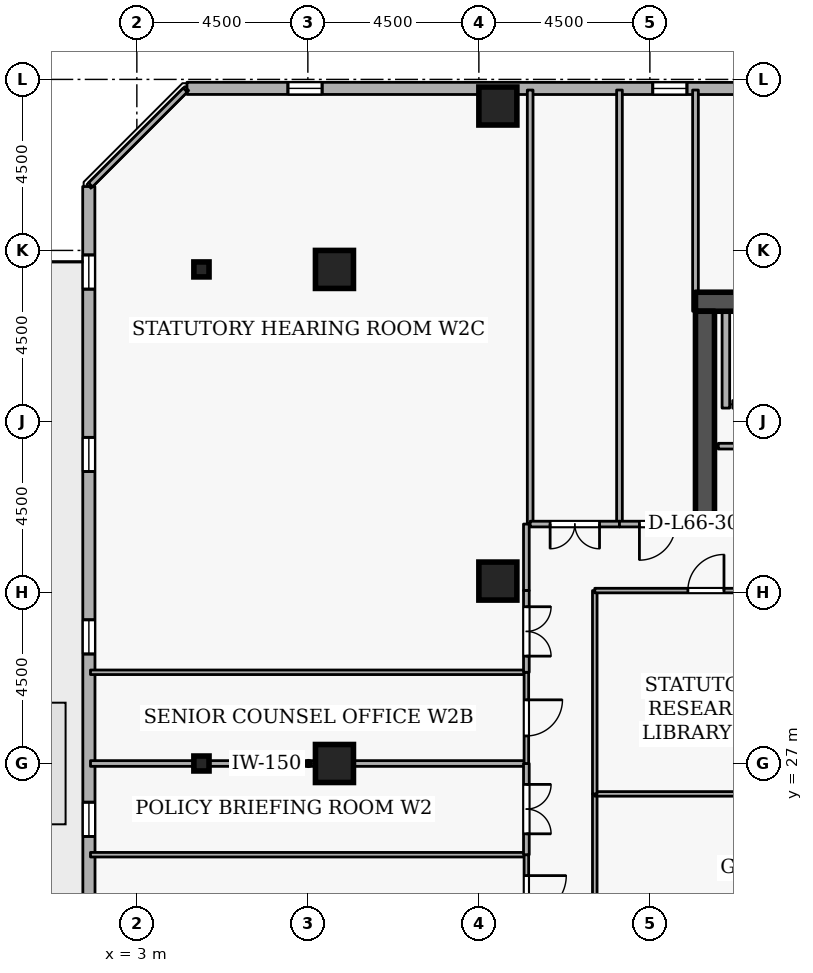
"""IFC4 building model, lengths in metres.
Left out: names, types, materials, properties, quantities, classifications, styles, units other than length and angle.
Written with IfcOpenShell. Run it as: python <this file> out.ifc"""

import sys

from ifc_helpers import new_model, si_unit, direction, frame, frame_2d, origin, origin_2d, place, context, subcontext, project, spatial, rectangle, i_section, extrude, element, fill, save


model = new_model("IFC4")
c1 = context("Model", 3, precision=1e-05, world=origin(), true_north=direction((0.0, 1.0)))
c2 = subcontext(c1, "Body", "Model", "MODEL_VIEW")
j1 = project(units=[si_unit("LENGTHUNIT", "METRE"), si_unit("PLANEANGLEUNIT", "RADIAN")], contexts=[c1])
p1 = place(None, origin())
s1 = spatial("IfcSite", under=j1, at=p1, CompositionType="ELEMENT")
p2 = place(p1, origin())
s2 = spatial("IfcBuilding", under=s1, at=p2, CompositionType="ELEMENT")
p3 = place(p2, frame((0.0, 0.0, 247.5)))
s3 = spatial("IfcBuildingStorey", under=s2, at=p3, CompositionType="ELEMENT", Elevation=247.5)
p4 = place(p3, frame((17.7, 39.15, 0.0), z_axis=(0.0, 0.0, 1.0), x_axis=(1.0, 0.0, 0.0)))
e1 = element("IfcWall", 1, at=p4, inside=s3, PredefinedType="SHEAR", context=c2, shape_type="SweptSolid", body=[
    extrude(rectangle(XDim=15.6, YDim=0.5, at=frame_2d((7.8, 0.0))), origin(), (0.0, 0.0, 1.0), 3.6),
])
p5 = place(p3, frame((17.95, 33.1, 0.0), z_axis=(0.0, 0.0, 1.0), x_axis=(0.0, 1.0, 0.0)))
e2 = element("IfcWall", 2, at=p5, inside=s3, PredefinedType="SHEAR", context=c2, shape_type="SweptSolid", body=[
    extrude(rectangle(XDim=5.8, YDim=0.5, at=frame_2d((2.9, 0.0))), origin(), (0.0, 0.0, 1.0), 3.6),
])
for number, where, z_axis, x_axis in (
    (3, (12.5, 44.3, 0.0), (0.0, 0.0, 1.0), (1.0, 0.0, 0.0)),
    (4, (8.2, 27.0, 0.0), (0.0, 0.0, 1.0), (1.0, 0.0, 0.0)),
    (5, (8.2, 40.0, 0.0), (0.0, 0.0, 1.0), (1.0, 0.0, 0.0)),
    (6, (12.5, 31.8, 0.0), (0.0, 0.0, 1.0), (1.0, 0.0, 0.0)),
):
    element("IfcColumn", number, at=place(p3, frame(where, z_axis=z_axis, x_axis=x_axis)), inside=s3, PredefinedType="COLUMN", context=c2, shape_type="SweptSolid", body=[
        extrude(rectangle(XDim=1.0, YDim=1.0, at=origin_2d()), origin(), (0.0, 0.0, 1.0), 3.6),
    ])
for number, where, z_axis, x_axis in (
    (7, (4.7, 27.0, 0.0), (0.0, 0.0, 1.0), (1.0, 0.0, 0.0)),
    (8, (4.7, 40.0, 0.0), (0.0, 0.0, 1.0), (1.0, 0.0, 0.0)),
):
    element("IfcColumn", number, at=place(p3, frame(where, z_axis=z_axis, x_axis=x_axis)), inside=s3, PredefinedType="COLUMN", context=c2, shape_type="SweptSolid", body=[
        extrude(i_section(OverallWidth=0.399, OverallDepth=0.394, WebThickness=0.023, FlangeThickness=0.037, FilletRadius=0.015, at=origin_2d()), origin(), (0.0, 0.0, 1.0), 3.6),
    ])
p6 = place(p3, frame((38.475, 44.757, 0.0), z_axis=(0.0, 0.0, 1.0), x_axis=(-0.99999997701, 0.000214431216, 0.0)))
e9 = element("IfcWall", 9, at=p6, inside=s3, PredefinedType="STANDARD", context=c2, shape_type="SweptSolid", body=[
    extrude(rectangle(XDim=34.156, YDim=0.32, at=frame_2d((17.078, 0.0))), origin(), (0.0, 0.0, 1.0), 2.7),
])
p7 = place(p6, frame((6.6, 0.0, 0.72)))
e10 = element("IfcOpeningElement", 10, at=p7, cuts=e9, PredefinedType="OPENING", context=c2, shape_type="SweptSolid", body=[
    extrude(rectangle(XDim=0.9, YDim=1.75, at=frame_2d((0.45, 0.875))), frame((0.0, 0.17, 0.0), z_axis=(0.0, -1.0, 0.0), x_axis=(1.0, 0.0, 0.0)), (0.0, 0.0, 1.0), 0.34),
])
p8 = place(p6, frame((16.2, 0.0, 0.72)))
e11 = element("IfcOpeningElement", 11, at=p8, cuts=e9, PredefinedType="OPENING", context=c2, shape_type="SweptSolid", body=[
    extrude(rectangle(XDim=0.9, YDim=1.75, at=frame_2d((0.45, 0.875))), frame((0.0, 0.17, 0.0), z_axis=(0.0, -1.0, 0.0), x_axis=(1.0, 0.0, 0.0)), (0.0, 0.0, 1.0), 0.34),
])
p9 = place(p6, frame((21.0, 0.0, 0.72)))
e12 = element("IfcOpeningElement", 12, at=p9, cuts=e9, PredefinedType="OPENING", context=c2, shape_type="SweptSolid", body=[
    extrude(rectangle(XDim=0.9, YDim=1.75, at=frame_2d((0.45, 0.875))), frame((0.0, 0.17, 0.0), z_axis=(0.0, -1.0, 0.0), x_axis=(1.0, 0.0, 0.0)), (0.0, 0.0, 1.0), 0.34),
])
p10 = place(p6, frame((30.6, 0.0, 0.72)))
e13 = element("IfcOpeningElement", 13, at=p10, cuts=e9, PredefinedType="OPENING", context=c2, shape_type="SweptSolid", body=[
    extrude(rectangle(XDim=0.9, YDim=1.75, at=frame_2d((0.45, 0.875))), frame((0.0, 0.17, 0.0), z_axis=(0.0, -1.0, 0.0), x_axis=(1.0, 0.0, 0.0)), (0.0, 0.0, 1.0), 0.34),
])
p11 = place(p3, frame((1.735, 42.181, 0.0), z_axis=(0.0, 0.0, 1.0), x_axis=(0.000214431216, -0.99999997701, 0.0)))
e14 = element("IfcWall", 14, at=p11, inside=s3, PredefinedType="STANDARD", context=c2, shape_type="SweptSolid", body=[
    extrude(rectangle(XDim=34.156, YDim=0.32, at=frame_2d((17.078, 0.0))), origin(), (0.0, 0.0, 1.0), 2.7),
])
p12 = place(p11, frame((18.878, 0.0, 0.0)))
e15 = element("IfcOpeningElement", 15, at=p12, cuts=e14, PredefinedType="OPENING", context=c2, shape_type="SweptSolid", body=[
    extrude(rectangle(XDim=1.0, YDim=2.08, at=frame_2d((0.5, 1.04))), frame((0.0, 0.17, 0.0), z_axis=(0.0, -1.0, 0.0), x_axis=(1.0, 0.0, 0.0)), (0.0, 0.0, 1.0), 0.34),
])
p13 = place(p11, frame((1.8, 0.0, 0.72)))
e16 = element("IfcOpeningElement", 16, at=p13, cuts=e14, PredefinedType="OPENING", context=c2, shape_type="SweptSolid", body=[
    extrude(rectangle(XDim=0.9, YDim=1.75, at=frame_2d((0.45, 0.875))), frame((0.0, 0.17, 0.0), z_axis=(0.0, -1.0, 0.0), x_axis=(1.0, 0.0, 0.0)), (0.0, 0.0, 1.0), 0.34),
])
p14 = place(p11, frame((6.6, 0.0, 0.72)))
e17 = element("IfcOpeningElement", 17, at=p14, cuts=e14, PredefinedType="OPENING", context=c2, shape_type="SweptSolid", body=[
    extrude(rectangle(XDim=0.9, YDim=1.75, at=frame_2d((0.45, 0.875))), frame((0.0, 0.17, 0.0), z_axis=(0.0, -1.0, 0.0), x_axis=(1.0, 0.0, 0.0)), (0.0, 0.0, 1.0), 0.34),
])
p15 = place(p11, frame((11.4, 0.0, 0.72)))
e18 = element("IfcOpeningElement", 18, at=p15, cuts=e14, PredefinedType="OPENING", context=c2, shape_type="SweptSolid", body=[
    extrude(rectangle(XDim=0.9, YDim=1.75, at=frame_2d((0.45, 0.875))), frame((0.0, 0.17, 0.0), z_axis=(0.0, -1.0, 0.0), x_axis=(1.0, 0.0, 0.0)), (0.0, 0.0, 1.0), 0.34),
])
p16 = place(p11, frame((16.2, 0.0, 0.72)))
e19 = element("IfcOpeningElement", 19, at=p16, cuts=e14, PredefinedType="OPENING", context=c2, shape_type="SweptSolid", body=[
    extrude(rectangle(XDim=0.9, YDim=1.75, at=frame_2d((0.45, 0.875))), frame((0.0, 0.17, 0.0), z_axis=(0.0, -1.0, 0.0), x_axis=(1.0, 0.0, 0.0)), (0.0, 0.0, 1.0), 0.34),
])
p17 = place(p11, frame((21.0, 0.0, 0.72)))
e20 = element("IfcOpeningElement", 20, at=p17, cuts=e14, PredefinedType="OPENING", context=c2, shape_type="SweptSolid", body=[
    extrude(rectangle(XDim=0.9, YDim=1.75, at=frame_2d((0.45, 0.875))), frame((0.0, 0.17, 0.0), z_axis=(0.0, -1.0, 0.0), x_axis=(1.0, 0.0, 0.0)), (0.0, 0.0, 1.0), 0.34),
])
p18 = place(p11, frame((25.8, 0.0, 0.72)))
e21 = element("IfcOpeningElement", 21, at=p18, cuts=e14, PredefinedType="OPENING", context=c2, shape_type="SweptSolid", body=[
    extrude(rectangle(XDim=0.9, YDim=1.75, at=frame_2d((0.45, 0.875))), frame((0.0, 0.17, 0.0), z_axis=(0.0, -1.0, 0.0), x_axis=(1.0, 0.0, 0.0)), (0.0, 0.0, 1.0), 0.34),
])
p19 = place(p11, frame((30.6, 0.0, 0.72)))
e22 = element("IfcOpeningElement", 22, at=p19, cuts=e14, PredefinedType="OPENING", context=c2, shape_type="SweptSolid", body=[
    extrude(rectangle(XDim=0.9, YDim=1.75, at=frame_2d((0.45, 0.875))), frame((0.0, 0.17, 0.0), z_axis=(0.0, -1.0, 0.0), x_axis=(1.0, 0.0, 0.0)), (0.0, 0.0, 1.0), 0.34),
])
p20 = place(p3, frame((20.62, 36.45, 0.0), z_axis=(0.0, 0.0, 1.0), x_axis=(-1.0, 0.0, 0.0)))
e23 = element("IfcWall", 23, at=p20, inside=s3, PredefinedType="STANDARD", context=c2, shape_type="SweptSolid", body=[
    extrude(rectangle(XDim=1.94, YDim=0.2, at=frame_2d((0.97, 0.0))), origin(), (0.0, 0.0, 1.0), 3.34),
])
p21 = place(p20, frame((0.46, 0.0, 0.0)))
e24 = element("IfcOpeningElement", 24, at=p21, cuts=e23, PredefinedType="OPENING", context=c2, shape_type="SweptSolid", body=[
    extrude(rectangle(XDim=1.02, YDim=2.06, at=frame_2d((0.51, 1.03))), frame((0.0, 0.11, 0.0), z_axis=(0.0, -1.0, 0.0), x_axis=(1.0, 0.0, 0.0)), (0.0, 0.0, 1.0), 0.22),
])
p22 = place(p3, frame((18.5, 36.352, 0.0), z_axis=(0.0, 0.0, 1.0), x_axis=(0.0, 1.0, 0.0)))
e25 = element("IfcWall", 25, at=p22, inside=s3, PredefinedType="STANDARD", context=c2, shape_type="SweptSolid", body=[
    extrude(rectangle(XDim=2.536, YDim=0.2, at=frame_2d((1.268, 0.0))), origin(), (0.0, 0.0, 1.0), 3.34),
])
p23 = place(p3, frame((18.3, 33.3, 0.0), z_axis=(0.0, 0.0, 1.0), x_axis=(1.0, 0.0, 0.0)))
e26 = element("IfcWall", 26, at=p23, inside=s3, PredefinedType="PARTITIONING", context=c2, shape_type="SweptSolid", body=[
    extrude(rectangle(XDim=3.3, YDim=0.15, at=frame_2d((1.65, 0.0))), origin(), (0.0, 0.0, 1.0), 3.34),
])
p24 = place(p23, frame((1.19, 0.0, 0.0)))
e27 = element("IfcOpeningElement", 27, at=p24, cuts=e26, PredefinedType="OPENING", context=c2, shape_type="SweptSolid", body=[
    extrude(rectangle(XDim=0.92, YDim=2.08, at=frame_2d((0.46, 1.04))), frame((0.0, 0.085, 0.0), z_axis=(0.0, -1.0, 0.0), x_axis=(1.0, 0.0, 0.0)), (0.0, 0.0, 1.0), 0.17),
])
p25 = place(p3, frame((21.6, 35.35, 0.0), z_axis=(0.0, 0.0, 1.0), x_axis=(-1.0, 0.0, 0.0)))
e28 = element("IfcWall", 28, at=p25, inside=s3, PredefinedType="PARTITIONING", context=c2, shape_type="SweptSolid", body=[
    extrude(rectangle(XDim=3.3, YDim=0.15, at=frame_2d((1.65, 0.0))), origin(), (0.0, 0.0, 1.0), 3.34),
])
for number, where, z_axis, x_axis in (
    (29, (13.35, 33.3, 0.0), (0.0, 0.0, 1.0), (0.0, 1.0, 0.0)),
    (30, (15.7, 44.72, 0.0), (0.0, 0.0, 1.0), (0.0, -1.0, 0.0)),
):
    element("IfcWall", number, at=place(p3, frame(where, z_axis=z_axis, x_axis=x_axis)), inside=s3, PredefinedType="PARTITIONING", context=c2, shape_type="SweptSolid", body=[
        extrude(rectangle(XDim=11.42, YDim=0.15, at=frame_2d((5.71, 0.0))), origin(), (0.0, 0.0, 1.0), 3.34),
    ])
p26 = place(p3, frame((15.7, 33.3, 0.0), z_axis=(0.0, 0.0, 1.0), x_axis=(-1.0, 0.0, 0.0)))
e31 = element("IfcWall", 31, at=p26, inside=s3, PredefinedType="PARTITIONING", context=c2, shape_type="SweptSolid", body=[
    extrude(rectangle(XDim=2.35, YDim=0.15, at=frame_2d((1.175, 0.0))), origin(), (0.0, 0.0, 1.0), 3.34),
])
p27 = place(p26, frame((0.525, 0.0, 0.0)))
e32 = element("IfcOpeningElement", 32, at=p27, cuts=e31, PredefinedType="OPENING", context=c2, shape_type="SweptSolid", body=[
    extrude(rectangle(XDim=1.3, YDim=2.12, at=frame_2d((0.65, 1.06))), frame((0.0, 0.085, 0.0), z_axis=(0.0, -1.0, 0.0), x_axis=(1.0, 0.0, 0.0)), (0.0, 0.0, 1.0), 0.17),
])
p28 = place(p3, frame((17.7, 44.72, 0.0), z_axis=(0.0, 0.0, 1.0), x_axis=(0.0, -1.0, 0.0)))
e33 = element("IfcWall", 33, at=p28, inside=s3, PredefinedType="PARTITIONING", context=c2, shape_type="SweptSolid", body=[
    extrude(rectangle(XDim=5.82, YDim=0.15, at=frame_2d((2.91, 0.0))), origin(), (0.0, 0.0, 1.0), 2.545),
])
p29 = place(p3, frame((17.7, 33.3, 0.0), z_axis=(0.0, 0.0, 1.0), x_axis=(-1.0, 0.0, 0.0)))
e34 = element("IfcWall", 34, at=p29, inside=s3, PredefinedType="PARTITIONING", context=c2, shape_type="SweptSolid", body=[
    extrude(rectangle(XDim=2.0, YDim=0.15, at=frame_2d((1.0, 0.0))), origin(), (0.0, 0.0, 1.0), 3.34),
])
p30 = place(p29, frame((0.525, 0.0, 0.0)))
e35 = element("IfcOpeningElement", 35, at=p30, cuts=e34, PredefinedType="OPENING", context=c2, shape_type="SweptSolid", body=[
    extrude(rectangle(XDim=0.95, YDim=2.1, at=frame_2d((0.475, 1.05))), frame((0.0, 0.085, 0.0), z_axis=(0.0, -1.0, 0.0), x_axis=(1.0, 0.0, 0.0)), (0.0, 0.0, 1.0), 0.17),
])
p31 = place(p3, frame((1.78, 24.6, 0.0), z_axis=(0.0, 0.0, 1.0), x_axis=(1.0, 0.0, 0.0)))
e36 = element("IfcWall", 36, at=p31, inside=s3, PredefinedType="PARTITIONING", context=c2, shape_type="SweptSolid", body=[
    extrude(rectangle(XDim=11.47, YDim=0.12, at=frame_2d((5.735, 0.0))), origin(), (0.0, 0.0, 1.0), 3.34),
])
p32 = place(p3, frame((13.25, 24.6, 0.0), z_axis=(0.0, 0.0, 1.0), x_axis=(0.0, -1.0, 0.0)))
e37 = element("IfcWall", 37, at=p32, inside=s3, PredefinedType="PARTITIONING", context=c2, shape_type="SweptSolid", body=[
    extrude(rectangle(XDim=2.15, YDim=0.12, at=frame_2d((1.075, 0.0))), origin(), (0.0, 0.0, 1.0), 3.34),
])
p33 = place(p32, frame((0.55, 0.0, 0.0)))
e38 = element("IfcOpeningElement", 38, at=p33, cuts=e37, PredefinedType="OPENING", context=c2, shape_type="SweptSolid", body=[
    extrude(rectangle(XDim=1.05, YDim=2.1, at=frame_2d((0.525, 1.05))), frame((0.0, 0.07, 0.0), z_axis=(0.0, -1.0, 0.0), x_axis=(1.0, 0.0, 0.0)), (0.0, 0.0, 1.0), 0.14),
])
p34 = place(p3, frame((1.78, 27.0, 0.0), z_axis=(0.0, 0.0, 1.0), x_axis=(1.0, 0.0, 0.0)))
e39 = element("IfcWall", 39, at=p34, inside=s3, PredefinedType="PARTITIONING", context=c2, shape_type="SweptSolid", body=[
    extrude(rectangle(XDim=11.47, YDim=0.15, at=frame_2d((5.735, 0.0))), origin(), (0.0, 0.0, 1.0), 2.882),
])
p35 = place(p3, frame((13.25, 27.0, 0.0), z_axis=(0.0, 0.0, 1.0), x_axis=(0.0, -1.0, 0.0)))
e40 = element("IfcWall", 40, at=p35, inside=s3, PredefinedType="PARTITIONING", context=c2, shape_type="SweptSolid", body=[
    extrude(rectangle(XDim=2.4, YDim=0.15, at=frame_2d((1.2, 0.0))), origin(), (0.0, 0.0, 1.0), 3.34),
])
p36 = place(p35, frame((0.55, 0.0, 0.0)))
e41 = element("IfcOpeningElement", 41, at=p36, cuts=e40, PredefinedType="OPENING", context=c2, shape_type="SweptSolid", body=[
    extrude(rectangle(XDim=1.3, YDim=2.12, at=frame_2d((0.65, 1.06))), frame((0.0, 0.085, 0.0), z_axis=(0.0, -1.0, 0.0), x_axis=(1.0, 0.0, 0.0)), (0.0, 0.0, 1.0), 0.17),
])
p37 = place(p3, frame((1.78, 29.4, 0.0), z_axis=(0.0, 0.0, 1.0), x_axis=(1.0, 0.0, 0.0)))
e42 = element("IfcWall", 42, at=p37, inside=s3, PredefinedType="PARTITIONING", context=c2, shape_type="SweptSolid", body=[
    extrude(rectangle(XDim=11.47, YDim=0.12, at=frame_2d((5.735, 0.0))), origin(), (0.0, 0.0, 1.0), 3.34),
])
p38 = place(p3, frame((13.25, 29.4, 0.0), z_axis=(0.0, 0.0, 1.0), x_axis=(0.0, -1.0, 0.0)))
e43 = element("IfcWall", 43, at=p38, inside=s3, PredefinedType="PARTITIONING", context=c2, shape_type="SweptSolid", body=[
    extrude(rectangle(XDim=2.4, YDim=0.12, at=frame_2d((1.2, 0.0))), origin(), (0.0, 0.0, 1.0), 3.34),
])
p39 = place(p38, frame((0.725, 0.0, 0.0)))
e44 = element("IfcOpeningElement", 44, at=p39, cuts=e43, PredefinedType="OPENING", context=c2, shape_type="SweptSolid", body=[
    extrude(rectangle(XDim=0.95, YDim=2.1, at=frame_2d((0.475, 1.05))), frame((0.0, 0.07, 0.0), z_axis=(0.0, -1.0, 0.0), x_axis=(1.0, 0.0, 0.0)), (0.0, 0.0, 1.0), 0.14),
])
p40 = place(p3, frame((1.78, 42.225, 0.0), z_axis=(0.0, 0.0, 1.0), x_axis=(0.707106781187, 0.707106781187, 0.0)))
e45 = element("IfcWall", 45, at=p40, inside=s3, PredefinedType="PARTITIONING", context=c2, shape_type="SweptSolid", body=[
    extrude(rectangle(XDim=3.528, YDim=0.15, at=frame_2d((1.764, 0.0))), origin(), (0.0, 0.0, 1.0), 3.34),
])
p41 = place(p3, frame((13.25, 33.3, 0.0), z_axis=(0.0, 0.0, 1.0), x_axis=(0.0, -1.0, 0.0)))
e46 = element("IfcWall", 46, at=p41, inside=s3, PredefinedType="PARTITIONING", context=c2, shape_type="SweptSolid", body=[
    extrude(rectangle(XDim=1.75, YDim=0.15, at=frame_2d((0.875, 0.0))), origin(), (0.0, 0.0, 1.0), 3.34),
])
p42 = place(p3, frame((13.25, 31.55, 0.0), z_axis=(0.0, 0.0, 1.0), x_axis=(0.0, -1.0, 0.0)))
e47 = element("IfcWall", 47, at=p42, inside=s3, PredefinedType="PARTITIONING", context=c2, shape_type="SweptSolid", body=[
    extrude(rectangle(XDim=2.15, YDim=0.15, at=frame_2d((1.075, 0.0))), origin(), (0.0, 0.0, 1.0), 3.34),
])
p43 = place(p42, frame((0.425, 0.0, 0.0)))
e48 = element("IfcOpeningElement", 48, at=p43, cuts=e47, PredefinedType="OPENING", context=c2, shape_type="SweptSolid", body=[
    extrude(rectangle(XDim=1.3, YDim=2.12, at=frame_2d((0.65, 1.06))), frame((0.0, 0.085, 0.0), z_axis=(0.0, -1.0, 0.0), x_axis=(1.0, 0.0, 0.0)), (0.0, 0.0, 1.0), 0.17),
])
p44 = place(p3, frame((15.05, 22.45, 0.0), z_axis=(0.0, 0.0, 1.0), x_axis=(0.0, 1.0, 0.0)))
e49 = element("IfcWall", 49, at=p44, inside=s3, PredefinedType="PARTITIONING", context=c2, shape_type="SweptSolid", body=[
    extrude(rectangle(XDim=3.75, YDim=0.12, at=frame_2d((1.875, 0.0))), origin(), (0.0, 0.0, 1.0), 3.34),
])
p45 = place(p3, frame((15.05, 26.2, 0.0), z_axis=(0.0, 0.0, 1.0), x_axis=(1.0, 0.0, 0.0)))
e50 = element("IfcWall", 50, at=p45, inside=s3, PredefinedType="PARTITIONING", context=c2, shape_type="SweptSolid", body=[
    extrude(rectangle(XDim=5.85, YDim=0.12, at=frame_2d((2.925, 0.0))), origin(), (0.0, 0.0, 1.0), 3.34),
])
p46 = place(p3, frame((15.05, 26.2, 0.0), z_axis=(0.0, 0.0, 1.0), x_axis=(0.0, 1.0, 0.0)))
e51 = element("IfcWall", 51, at=p46, inside=s3, PredefinedType="PARTITIONING", context=c2, shape_type="SweptSolid", body=[
    extrude(rectangle(XDim=5.35, YDim=0.12, at=frame_2d((2.675, 0.0))), origin(), (0.0, 0.0, 1.0), 3.34),
])
p47 = place(p3, frame((15.05, 31.55, 0.0), z_axis=(0.0, 0.0, 1.0), x_axis=(1.0, 0.0, 0.0)))
e52 = element("IfcWall", 52, at=p47, inside=s3, PredefinedType="PARTITIONING", context=c2, shape_type="SweptSolid", body=[
    extrude(rectangle(XDim=5.85, YDim=0.12, at=frame_2d((2.925, 0.0))), origin(), (0.0, 0.0, 1.0), 3.34),
])
p48 = place(p47, frame((2.45, 0.0, 0.0)))
e53 = element("IfcOpeningElement", 53, at=p48, cuts=e52, PredefinedType="OPENING", context=c2, shape_type="SweptSolid", body=[
    extrude(rectangle(XDim=0.95, YDim=2.1, at=frame_2d((0.475, 1.05))), frame((0.0, 0.07, 0.0), z_axis=(0.0, -1.0, 0.0), x_axis=(1.0, 0.0, 0.0)), (0.0, 0.0, 1.0), 0.14),
])
p49 = place(p9, origin())
e54 = element("IfcWindow", 54, at=p49, inside=s3, PartitioningType="SINGLE_PANEL", PredefinedType="WINDOW", context=c2, shape_type="SweptSolid", body=[
    extrude(rectangle(XDim=0.9, YDim=1.75, at=frame_2d((0.45, 0.875))), frame((0.0, 0.03, 0.0), z_axis=(0.0, -1.0, 0.0), x_axis=(1.0, 0.0, 0.0)), (0.0, 0.0, 1.0), 0.06),
])
fill(e12, e54)
p50 = place(p10, origin())
e55 = element("IfcWindow", 55, at=p50, inside=s3, PartitioningType="SINGLE_PANEL", PredefinedType="WINDOW", context=c2, shape_type="SweptSolid", body=[
    extrude(rectangle(XDim=0.9, YDim=1.75, at=frame_2d((0.45, 0.875))), frame((0.0, 0.03, 0.0), z_axis=(0.0, -1.0, 0.0), x_axis=(1.0, 0.0, 0.0)), (0.0, 0.0, 1.0), 0.06),
])
fill(e13, e55)
p51 = place(p13, origin())
e56 = element("IfcWindow", 56, at=p51, inside=s3, PartitioningType="SINGLE_PANEL", PredefinedType="WINDOW", context=c2, shape_type="SweptSolid", body=[
    extrude(rectangle(XDim=0.9, YDim=1.75, at=frame_2d((0.45, 0.875))), frame((0.0, 0.03, 0.0), z_axis=(0.0, -1.0, 0.0), x_axis=(1.0, 0.0, 0.0)), (0.0, 0.0, 1.0), 0.06),
])
fill(e16, e56)
p52 = place(p14, origin())
e57 = element("IfcWindow", 57, at=p52, inside=s3, PartitioningType="SINGLE_PANEL", PredefinedType="WINDOW", context=c2, shape_type="SweptSolid", body=[
    extrude(rectangle(XDim=0.9, YDim=1.75, at=frame_2d((0.45, 0.875))), frame((0.0, 0.03, 0.0), z_axis=(0.0, -1.0, 0.0), x_axis=(1.0, 0.0, 0.0)), (0.0, 0.0, 1.0), 0.06),
])
fill(e17, e57)
p53 = place(p15, origin())
e58 = element("IfcWindow", 58, at=p53, inside=s3, PartitioningType="SINGLE_PANEL", PredefinedType="WINDOW", context=c2, shape_type="SweptSolid", body=[
    extrude(rectangle(XDim=0.9, YDim=1.75, at=frame_2d((0.45, 0.875))), frame((0.0, 0.03, 0.0), z_axis=(0.0, -1.0, 0.0), x_axis=(1.0, 0.0, 0.0)), (0.0, 0.0, 1.0), 0.06),
])
fill(e18, e58)
p54 = place(p16, origin())
e59 = element("IfcWindow", 59, at=p54, inside=s3, PartitioningType="SINGLE_PANEL", PredefinedType="WINDOW", context=c2, shape_type="SweptSolid", body=[
    extrude(rectangle(XDim=0.9, YDim=1.75, at=frame_2d((0.45, 0.875))), frame((0.0, 0.03, 0.0), z_axis=(0.0, -1.0, 0.0), x_axis=(1.0, 0.0, 0.0)), (0.0, 0.0, 1.0), 0.06),
])
fill(e19, e59)
p55 = place(p27, origin())
e60 = element("IfcDoor", 60, at=p55, inside=s3, OperationType="DOUBLE_DOOR_SINGLE_SWING", PredefinedType="DOOR", context=c2, shape_type="SweptSolid", body=[
    extrude(rectangle(XDim=1.3, YDim=2.12, at=frame_2d((0.65, 1.06))), frame((0.0, 0.025, 0.0), z_axis=(0.0, -1.0, 0.0), x_axis=(1.0, 0.0, 0.0)), (0.0, 0.0, 1.0), 0.05),
])
fill(e32, e60)
p56 = place(p30, origin())
e61 = element("IfcDoor", 61, at=p56, inside=s3, OperationType="SINGLE_SWING_RIGHT", PredefinedType="DOOR", context=c2, shape_type="SweptSolid", body=[
    extrude(rectangle(XDim=0.95, YDim=2.1, at=frame_2d((0.475, 1.05))), frame((0.0, 0.025, 0.0), z_axis=(0.0, -1.0, 0.0), x_axis=(1.0, 0.0, 0.0)), (0.0, 0.0, 1.0), 0.05),
])
fill(e35, e61)
p57 = place(p33, origin())
e62 = element("IfcDoor", 62, at=p57, inside=s3, OperationType="SINGLE_SWING_LEFT", PredefinedType="DOOR", context=c2, shape_type="SweptSolid", body=[
    extrude(rectangle(XDim=1.05, YDim=2.1, at=frame_2d((0.525, 1.05))), frame((0.0, 0.025, 0.0), z_axis=(0.0, -1.0, 0.0), x_axis=(1.0, 0.0, 0.0)), (0.0, 0.0, 1.0), 0.05),
])
fill(e38, e62)
p58 = place(p36, origin())
e63 = element("IfcDoor", 63, at=p58, inside=s3, OperationType="DOUBLE_DOOR_SINGLE_SWING", PredefinedType="DOOR", context=c2, shape_type="SweptSolid", body=[
    extrude(rectangle(XDim=1.3, YDim=2.12, at=frame_2d((0.65, 1.06))), frame((0.0, 0.025, 0.0), z_axis=(0.0, -1.0, 0.0), x_axis=(1.0, 0.0, 0.0)), (0.0, 0.0, 1.0), 0.05),
])
fill(e41, e63)
p59 = place(p39, origin())
e64 = element("IfcDoor", 64, at=p59, inside=s3, OperationType="SINGLE_SWING_LEFT", PredefinedType="DOOR", context=c2, shape_type="SweptSolid", body=[
    extrude(rectangle(XDim=0.95, YDim=2.1, at=frame_2d((0.475, 1.05))), frame((0.0, 0.025, 0.0), z_axis=(0.0, -1.0, 0.0), x_axis=(1.0, 0.0, 0.0)), (0.0, 0.0, 1.0), 0.05),
])
fill(e44, e64)
p60 = place(p43, origin())
e65 = element("IfcDoor", 65, at=p60, inside=s3, OperationType="DOUBLE_DOOR_SINGLE_SWING", PredefinedType="DOOR", context=c2, shape_type="SweptSolid", body=[
    extrude(rectangle(XDim=1.3, YDim=2.12, at=frame_2d((0.65, 1.06))), frame((0.0, 0.025, 0.0), z_axis=(0.0, -1.0, 0.0), x_axis=(1.0, 0.0, 0.0)), (0.0, 0.0, 1.0), 0.05),
])
fill(e48, e65)
p61 = place(p48, origin())
e66 = element("IfcDoor", 66, at=p61, inside=s3, OperationType="SINGLE_SWING_RIGHT", PredefinedType="DOOR", context=c2, shape_type="SweptSolid", body=[
    extrude(rectangle(XDim=0.95, YDim=2.1, at=frame_2d((0.475, 1.05))), frame((0.0, 0.025, 0.0), z_axis=(0.0, -1.0, 0.0), x_axis=(1.0, 0.0, 0.0)), (0.0, 0.0, 1.0), 0.05),
])
fill(e53, e66)
save(model, sys.argv[1])
